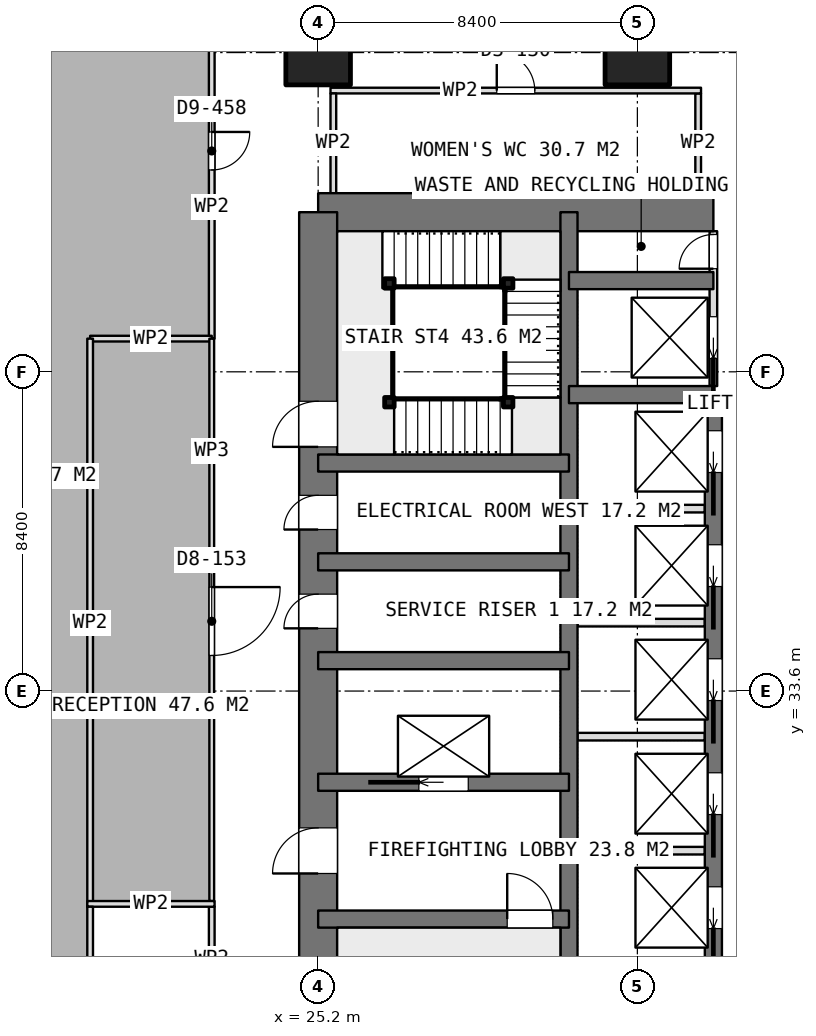
"""IFC4 building model, lengths in metres.
Left out: names, types, materials, properties, quantities, classifications, styles, units other than length and angle.
Written with IfcOpenShell. Run it as: python <this file> out.ifc"""

import sys

from ifc_helpers import new_model, si_unit, direction, frame, frame_2d, origin, origin_2d, place, context, subcontext, project, spatial, rectangle, extrude, element, fill, save


model = new_model("IFC4")
c1 = context("Model", 3, precision=1e-05, world=origin(), true_north=direction((0.0, 1.0)))
c2 = subcontext(c1, "Body", "Model", "MODEL_VIEW")
j1 = project(units=[si_unit("LENGTHUNIT", "METRE"), si_unit("PLANEANGLEUNIT", "RADIAN")], contexts=[c1])
p1 = place(None, origin())
s1 = spatial("IfcSite", under=j1, at=p1, CompositionType="ELEMENT")
p2 = place(p1, origin())
s2 = spatial("IfcBuilding", under=s1, at=p2, CompositionType="ELEMENT")
p3 = place(p2, frame((0.0, 0.0, 121.55)))
s3 = spatial("IfcBuildingStorey", under=s2, at=p3, CompositionType="ELEMENT", Elevation=121.55)
p4 = place(p3, frame((25.2, 46.2, 0.0), z_axis=(0.0, 0.0, 1.0), x_axis=(1.0, 0.0, 0.0)))
e1 = element("IfcWall", 1, at=p4, inside=s3, PredefinedType="SHEAR", context=c2, shape_type="SweptSolid", body=[
    extrude(rectangle(XDim=10.4, YDim=1.0, at=frame_2d((5.2, 0.0))), origin(), (0.0, 0.0, 1.0), 3.75),
])
p5 = place(p3, frame((25.2, 21.0, 0.0), z_axis=(0.0, 0.0, 1.0), x_axis=(0.0, 1.0, 0.0)))
e2 = element("IfcWall", 2, at=p5, inside=s3, PredefinedType="SHEAR", context=c2, shape_type="SweptSolid", body=[
    extrude(rectangle(XDim=25.2, YDim=1.0, at=frame_2d((12.6, 0.0))), origin(), (0.0, 0.0, 1.0), 3.75),
])
p6 = place(p5, frame((7.8, 0.0, 0.0)))
e3 = element("IfcOpeningElement", 3, at=p6, cuts=e2, PredefinedType="OPENING", context=c2, shape_type="SweptSolid", body=[
    extrude(rectangle(XDim=1.2, YDim=2.1, at=frame_2d((0.6, 1.05))), frame((0.0, 0.51, 0.0), z_axis=(0.0, -1.0, 0.0), x_axis=(1.0, 0.0, 0.0)), (0.0, 0.0, 1.0), 1.02),
])
p7 = place(p5, frame((14.25, 0.0, 0.0)))
e4 = element("IfcOpeningElement", 4, at=p7, cuts=e2, PredefinedType="OPENING", context=c2, shape_type="SweptSolid", body=[
    extrude(rectangle(XDim=0.9, YDim=2.1, at=frame_2d((0.45, 1.05))), frame((0.0, 0.51, 0.0), z_axis=(0.0, -1.0, 0.0), x_axis=(1.0, 0.0, 0.0)), (0.0, 0.0, 1.0), 1.02),
])
p8 = place(p5, frame((16.85, 0.0, 0.0)))
e5 = element("IfcOpeningElement", 5, at=p8, cuts=e2, PredefinedType="OPENING", context=c2, shape_type="SweptSolid", body=[
    extrude(rectangle(XDim=0.9, YDim=2.1, at=frame_2d((0.45, 1.05))), frame((0.0, 0.51, 0.0), z_axis=(0.0, -1.0, 0.0), x_axis=(1.0, 0.0, 0.0)), (0.0, 0.0, 1.0), 1.02),
])
p9 = place(p5, frame((19.025, 0.0, 0.0)))
e6 = element("IfcOpeningElement", 6, at=p9, cuts=e2, PredefinedType="OPENING", context=c2, shape_type="SweptSolid", body=[
    extrude(rectangle(XDim=1.2, YDim=2.1, at=frame_2d((0.6, 1.05))), frame((0.0, 0.51, 0.0), z_axis=(0.0, -1.0, 0.0), x_axis=(1.0, 0.0, 0.0)), (0.0, 0.0, 1.0), 1.02),
])
p10 = place(p3, frame((31.8, 21.0, 0.0), z_axis=(0.0, 0.0, 1.0), x_axis=(0.0, 1.0, 0.0)))
e7 = element("IfcWall", 7, at=p10, inside=s3, PredefinedType="SHEAR", context=c2, shape_type="SweptSolid", body=[
    extrude(rectangle(XDim=25.2, YDim=0.45, at=frame_2d((12.6, 0.0))), origin(), (0.0, 0.0, 1.0), 3.75),
])
p11 = place(p3, frame((35.6, 23.4, 0.0), z_axis=(0.0, 0.0, 1.0), x_axis=(0.0, 1.0, 0.0)))
e8 = element("IfcWall", 8, at=p11, inside=s3, PredefinedType="SHEAR", context=c2, shape_type="SweptSolid", body=[
    extrude(rectangle(XDim=18.0, YDim=0.45, at=frame_2d((9.0, 0.0))), origin(), (0.0, 0.0, 1.0), 3.75),
])
p12 = place(p11, frame((0.95, 0.0, 0.0)))
e9 = element("IfcOpeningElement", 9, at=p12, cuts=e8, PredefinedType="OPENING", context=c2, shape_type="SweptSolid", body=[
    extrude(rectangle(XDim=1.1, YDim=2.1, at=frame_2d((0.55, 1.05))), frame((0.0, 0.235, 0.0), z_axis=(0.0, -1.0, 0.0), x_axis=(1.0, 0.0, 0.0)), (0.0, 0.0, 1.0), 0.47),
])
p13 = place(p11, frame((3.95, 0.0, 0.0)))
e10 = element("IfcOpeningElement", 10, at=p13, cuts=e8, PredefinedType="OPENING", context=c2, shape_type="SweptSolid", body=[
    extrude(rectangle(XDim=1.1, YDim=2.1, at=frame_2d((0.55, 1.05))), frame((0.0, 0.235, 0.0), z_axis=(0.0, -1.0, 0.0), x_axis=(1.0, 0.0, 0.0)), (0.0, 0.0, 1.0), 0.47),
])
p14 = place(p11, frame((6.95, 0.0, 0.0)))
e11 = element("IfcOpeningElement", 11, at=p14, cuts=e8, PredefinedType="OPENING", context=c2, shape_type="SweptSolid", body=[
    extrude(rectangle(XDim=1.1, YDim=2.1, at=frame_2d((0.55, 1.05))), frame((0.0, 0.235, 0.0), z_axis=(0.0, -1.0, 0.0), x_axis=(1.0, 0.0, 0.0)), (0.0, 0.0, 1.0), 0.47),
])
p15 = place(p11, frame((9.95, 0.0, 0.0)))
e12 = element("IfcOpeningElement", 12, at=p15, cuts=e8, PredefinedType="OPENING", context=c2, shape_type="SweptSolid", body=[
    extrude(rectangle(XDim=1.1, YDim=2.1, at=frame_2d((0.55, 1.05))), frame((0.0, 0.235, 0.0), z_axis=(0.0, -1.0, 0.0), x_axis=(1.0, 0.0, 0.0)), (0.0, 0.0, 1.0), 0.47),
])
p16 = place(p11, frame((12.95, 0.0, 0.0)))
e13 = element("IfcOpeningElement", 13, at=p16, cuts=e8, PredefinedType="OPENING", context=c2, shape_type="SweptSolid", body=[
    extrude(rectangle(XDim=1.1, YDim=2.1, at=frame_2d((0.55, 1.05))), frame((0.0, 0.235, 0.0), z_axis=(0.0, -1.0, 0.0), x_axis=(1.0, 0.0, 0.0)), (0.0, 0.0, 1.0), 0.47),
])
p17 = place(p11, frame((15.95, 0.0, 0.0)))
e14 = element("IfcOpeningElement", 14, at=p17, cuts=e8, PredefinedType="OPENING", context=c2, shape_type="SweptSolid", body=[
    extrude(rectangle(XDim=1.1, YDim=2.1, at=frame_2d((0.55, 1.05))), frame((0.0, 0.235, 0.0), z_axis=(0.0, -1.0, 0.0), x_axis=(1.0, 0.0, 0.0)), (0.0, 0.0, 1.0), 0.47),
])
for number, where, z_axis, x_axis in (
    (15, (31.8, 41.4, 0.0), (0.0, 0.0, 1.0), (1.0, 0.0, 0.0)),
    (16, (31.8, 44.4, 0.0), (0.0, 0.0, 1.0), (1.0, 0.0, 0.0)),
):
    element("IfcWall", number, at=place(p3, frame(where, z_axis=z_axis, x_axis=x_axis)), inside=s3, PredefinedType="SHEAR", context=c2, shape_type="SweptSolid", body=[
        extrude(rectangle(XDim=3.8, YDim=0.45, at=frame_2d((1.9, 0.0))), origin(), (0.0, 0.0, 1.0), 3.75),
    ])
p18 = place(p3, frame((25.2, 27.6, 0.0), z_axis=(0.0, 0.0, 1.0), x_axis=(1.0, 0.0, 0.0)))
e17 = element("IfcWall", 17, at=p18, inside=s3, PredefinedType="SHEAR", context=c2, shape_type="SweptSolid", body=[
    extrude(rectangle(XDim=6.6, YDim=0.45, at=frame_2d((3.3, 0.0))), origin(), (0.0, 0.0, 1.0), 3.75),
])
p19 = place(p18, frame((4.975, 0.0, 0.0)))
e18 = element("IfcOpeningElement", 18, at=p19, cuts=e17, PredefinedType="OPENING", context=c2, shape_type="SweptSolid", body=[
    extrude(rectangle(XDim=1.2, YDim=2.1, at=frame_2d((0.6, 1.05))), frame((0.0, 0.235, 0.0), z_axis=(0.0, -1.0, 0.0), x_axis=(1.0, 0.0, 0.0)), (0.0, 0.0, 1.0), 0.47),
])
p20 = place(p3, frame((25.2, 31.2, 0.0), z_axis=(0.0, 0.0, 1.0), x_axis=(1.0, 0.0, 0.0)))
e19 = element("IfcWall", 19, at=p20, inside=s3, PredefinedType="SHEAR", context=c2, shape_type="SweptSolid", body=[
    extrude(rectangle(XDim=6.6, YDim=0.45, at=frame_2d((3.3, 0.0))), origin(), (0.0, 0.0, 1.0), 3.75),
])
p21 = place(p20, frame((2.65, 0.0, 0.0)))
e20 = element("IfcOpeningElement", 20, at=p21, cuts=e19, PredefinedType="OPENING", context=c2, shape_type="SweptSolid", body=[
    extrude(rectangle(XDim=1.3, YDim=2.1, at=frame_2d((0.65, 1.05))), frame((0.0, 0.235, 0.0), z_axis=(0.0, -1.0, 0.0), x_axis=(1.0, 0.0, 0.0)), (0.0, 0.0, 1.0), 0.47),
])
for number, where, z_axis, x_axis in (
    (21, (25.2, 34.4, 0.0), (0.0, 0.0, 1.0), (1.0, 0.0, 0.0)),
    (22, (25.2, 37.0, 0.0), (0.0, 0.0, 1.0), (1.0, 0.0, 0.0)),
    (23, (25.2, 39.6, 0.0), (0.0, 0.0, 1.0), (1.0, 0.0, 0.0)),
):
    element("IfcWall", number, at=place(p3, frame(where, z_axis=z_axis, x_axis=x_axis)), inside=s3, PredefinedType="SHEAR", context=c2, shape_type="SweptSolid", body=[
        extrude(rectangle(XDim=6.6, YDim=0.45, at=frame_2d((3.3, 0.0))), origin(), (0.0, 0.0, 1.0), 3.75),
    ])
for number, where, z_axis, x_axis in (
    (24, (25.2, 50.4, 0.0), (0.0, 0.0, 1.0), (1.0, 0.0, 0.0)),
    (25, (33.6, 50.4, 0.0), (0.0, 0.0, 1.0), (1.0, 0.0, 0.0)),
):
    element("IfcColumn", number, at=place(p3, frame(where, z_axis=z_axis, x_axis=x_axis)), inside=s3, PredefinedType="COLUMN", context=c2, shape_type="SweptSolid", body=[
        extrude(rectangle(XDim=1.7, YDim=1.7, at=origin_2d()), origin(), (0.0, 0.0, 1.0), 3.75),
    ])
for number, where, z_axis, x_axis in (
    (26, (32.025, 29.4, 0.0), (0.0, 0.0, 1.0), (1.0, 0.0, 0.0)),
    (27, (32.025, 32.4, 0.0), (0.0, 0.0, 1.0), (1.0, 0.0, 0.0)),
    (28, (32.025, 35.4, 0.0), (0.0, 0.0, 1.0), (1.0, 0.0, 0.0)),
    (29, (32.025, 38.4, 0.0), (0.0, 0.0, 1.0), (1.0, 0.0, 0.0)),
):
    element("IfcWall", number, at=place(p3, frame(where, z_axis=z_axis, x_axis=x_axis)), inside=s3, PredefinedType="PARTITIONING", context=c2, shape_type="SweptSolid", body=[
        extrude(rectangle(XDim=3.35, YDim=0.2, at=frame_2d((1.675, 0.0))), origin(), (0.0, 0.0, 1.0), 3.5),
    ])
p22 = place(p3, frame((35.6, 41.625, 0.0), z_axis=(0.0, 0.0, 1.0), x_axis=(0.0, 1.0, 0.0)))
e30 = element("IfcWall", 30, at=p22, inside=s3, PredefinedType="PARTITIONING", context=c2, shape_type="SweptSolid", body=[
    extrude(rectangle(XDim=4.075, YDim=0.2, at=frame_2d((2.038, 0.0))), origin(), (0.0, 0.0, 1.0), 3.5),
])
p23 = place(p22, frame((3.088, 0.0, 0.0)))
e31 = element("IfcOpeningElement", 31, at=p23, cuts=e30, PredefinedType="OPENING", context=c2, shape_type="SweptSolid", body=[
    extrude(rectangle(XDim=0.9, YDim=2.1, at=frame_2d((0.45, 1.05))), frame((0.0, 0.11, 0.0), z_axis=(0.0, -1.0, 0.0), x_axis=(1.0, 0.0, 0.0)), (0.0, 0.0, 1.0), 0.22),
])
p24 = place(p22, frame((0.725, 0.0, 0.0)))
e32 = element("IfcOpeningElement", 32, at=p24, cuts=e30, PredefinedType="OPENING", context=c2, shape_type="SweptSolid", body=[
    extrude(rectangle(XDim=1.1, YDim=2.1, at=frame_2d((0.55, 1.05))), frame((0.0, 0.11, 0.0), z_axis=(0.0, -1.0, 0.0), x_axis=(1.0, 0.0, 0.0)), (0.0, 0.0, 1.0), 0.22),
])
p25 = place(p3, frame((25.525, 49.4, 0.0), z_axis=(0.0, 0.0, 1.0), x_axis=(1.0, 0.0, 0.0)))
e33 = element("IfcWall", 33, at=p25, inside=s3, PredefinedType="PARTITIONING", context=c2, shape_type="SweptSolid", body=[
    extrude(rectangle(XDim=9.75, YDim=0.15, at=frame_2d((4.875, 0.0))), origin(), (0.0, 0.0, 1.0), 3.5),
])
p26 = place(p25, frame((4.375, 0.0, 0.0)))
e34 = element("IfcOpeningElement", 34, at=p26, cuts=e33, PredefinedType="OPENING", context=c2, shape_type="SweptSolid", body=[
    extrude(rectangle(XDim=1.0, YDim=2.1, at=frame_2d((0.5, 1.05))), frame((0.0, 0.085, 0.0), z_axis=(0.0, -1.0, 0.0), x_axis=(1.0, 0.0, 0.0)), (0.0, 0.0, 1.0), 0.17),
])
for number, where, z_axis, x_axis in (
    (35, (25.6, 46.7, 0.0), (0.0, 0.0, 1.0), (0.0, 1.0, 0.0)),
    (36, (35.2, 46.7, 0.0), (0.0, 0.0, 1.0), (0.0, 1.0, 0.0)),
):
    element("IfcWall", number, at=place(p3, frame(where, z_axis=z_axis, x_axis=x_axis)), inside=s3, PredefinedType="PARTITIONING", context=c2, shape_type="SweptSolid", body=[
        extrude(rectangle(XDim=2.625, YDim=0.15, at=frame_2d((1.312, 0.0))), origin(), (0.0, 0.0, 1.0), 3.5),
    ])
p27 = place(p3, frame((19.125, 28.0, 0.0), z_axis=(0.0, 0.0, 1.0), x_axis=(1.0, 0.0, 0.0)))
e37 = element("IfcWall", 37, at=p27, inside=s3, PredefinedType="PARTITIONING", context=c2, shape_type="SweptSolid", body=[
    extrude(rectangle(XDim=3.35, YDim=0.15, at=frame_2d((1.675, 0.0))), origin(), (0.0, 0.0, 1.0), 3.5),
])
p28 = place(p3, frame((19.2, 21.075, 0.0), z_axis=(0.0, 0.0, 1.0), x_axis=(0.0, 1.0, 0.0)))
e38 = element("IfcWall", 38, at=p28, inside=s3, PredefinedType="PARTITIONING", context=c2, shape_type="SweptSolid", body=[
    extrude(rectangle(XDim=6.85, YDim=0.15, at=frame_2d((3.425, 0.0))), origin(), (0.0, 0.0, 1.0), 3.5),
])
p29 = place(p3, frame((22.4, 21.075, 0.0), z_axis=(0.0, 0.0, 1.0), x_axis=(0.0, 1.0, 0.0)))
e39 = element("IfcWall", 39, at=p29, inside=s3, PredefinedType="PARTITIONING", context=c2, shape_type="SweptSolid", body=[
    extrude(rectangle(XDim=6.85, YDim=0.15, at=frame_2d((3.425, 0.0))), origin(), (0.0, 0.0, 1.0), 3.5),
])
p30 = place(p29, frame((2.925, 0.0, 0.0)))
e40 = element("IfcOpeningElement", 40, at=p30, cuts=e39, PredefinedType="OPENING", context=c2, shape_type="SweptSolid", body=[
    extrude(rectangle(XDim=1.0, YDim=2.1, at=frame_2d((0.5, 1.05))), frame((0.0, 0.085, 0.0), z_axis=(0.0, -1.0, 0.0), x_axis=(1.0, 0.0, 0.0)), (0.0, 0.0, 1.0), 0.17),
])
p31 = place(p3, frame((22.4, 52.75, 0.0), z_axis=(0.0, 0.0, 1.0), x_axis=(0.0, -1.0, 0.0)))
e41 = element("IfcWall", 41, at=p31, inside=s3, PredefinedType="PARTITIONING", context=c2, shape_type="SweptSolid", body=[
    extrude(rectangle(XDim=9.877, YDim=0.15, at=frame_2d((4.938, 0.0))), origin(), (0.0, 0.0, 1.0), 3.5),
])
p32 = place(p31, frame((4.439, 0.0, 0.0)))
e42 = element("IfcOpeningElement", 42, at=p32, cuts=e41, PredefinedType="OPENING", context=c2, shape_type="SweptSolid", body=[
    extrude(rectangle(XDim=1.0, YDim=2.1, at=frame_2d((0.5, 1.05))), frame((0.0, 0.085, 0.0), z_axis=(0.0, -1.0, 0.0), x_axis=(1.0, 0.0, 0.0)), (0.0, 0.0, 1.0), 0.17),
])
p33 = place(p3, frame((22.4, 42.873, 0.0), z_axis=(0.0, 0.0, 1.0), x_axis=(-1.0, 0.0, 0.0)))
e43 = element("IfcWall", 43, at=p33, inside=s3, PredefinedType="PARTITIONING", context=c2, shape_type="SweptSolid", body=[
    extrude(rectangle(XDim=3.2, YDim=0.15, at=frame_2d((1.6, 0.0))), origin(), (0.0, 0.0, 1.0), 3.5),
])
p34 = place(p3, frame((19.2, 42.873, 0.0), z_axis=(0.0, 0.0, 1.0), x_axis=(0.0, -1.0, 0.0)))
e44 = element("IfcWall", 44, at=p34, inside=s3, PredefinedType="PARTITIONING", context=c2, shape_type="SweptSolid", body=[
    extrude(rectangle(XDim=14.948, YDim=0.15, at=frame_2d((7.474, 0.0))), origin(), (0.0, 0.0, 1.0), 3.5),
])
p35 = place(p3, frame((22.4, 42.872, 0.0), z_axis=(0.0, 0.0, 1.0), x_axis=(0.0, -1.0, 0.0)))
e45 = element("IfcWall", 45, at=p35, inside=s3, PredefinedType="PARTITIONING", context=c2, shape_type="SweptSolid", body=[
    extrude(rectangle(XDim=14.797, YDim=0.125, at=frame_2d((7.398, 0.0))), origin(), (0.0, 0.0, 1.0), 3.5),
])
p36 = place(p35, frame((6.536, 0.0, 0.0)))
e46 = element("IfcOpeningElement", 46, at=p36, cuts=e45, PredefinedType="OPENING", context=c2, shape_type="SweptSolid", body=[
    extrude(rectangle(XDim=1.8, YDim=2.1, at=frame_2d((0.9, 1.05))), frame((0.0, 0.073, 0.0), z_axis=(0.0, -1.0, 0.0), x_axis=(1.0, 0.0, 0.0)), (0.0, 0.0, 1.0), 0.145),
])
for number, where, z_axis, x_axis in (
    (47, (27.075, 41.2, 0.0), (0.0, 0.0, 1.0), (1.0, 0.0, 0.0)),
    (48, (30.2, 41.2, 0.0), (0.0, 0.0, 1.0), (1.0, 0.0, 0.0)),
    (49, (30.2, 44.325, 0.0), (0.0, 0.0, 1.0), (1.0, 0.0, 0.0)),
    (50, (27.075, 44.325, 0.0), (0.0, 0.0, 1.0), (1.0, 0.0, 0.0)),
):
    element("IfcColumn", number, at=place(p3, frame(where, z_axis=z_axis, x_axis=x_axis)), inside=s3, PredefinedType="COLUMN", context=c2, shape_type="SweptSolid", body=[
        extrude(rectangle(XDim=0.25, YDim=0.25, at=origin_2d()), origin(), (0.0, 0.0, 1.0), 3.75),
    ])
p37 = place(p6, origin())
e51 = element("IfcDoor", 51, at=p37, inside=s3, OperationType="SINGLE_SWING_LEFT", PredefinedType="DOOR", context=c2, shape_type="SweptSolid", body=[
    extrude(rectangle(XDim=1.2, YDim=2.1, at=frame_2d((0.6, 1.05))), frame((0.0, 0.025, 0.0), z_axis=(0.0, -1.0, 0.0), x_axis=(1.0, 0.0, 0.0)), (0.0, 0.0, 1.0), 0.05),
])
fill(e3, e51)
p38 = place(p7, origin())
e52 = element("IfcDoor", 52, at=p38, inside=s3, OperationType="SINGLE_SWING_LEFT", PredefinedType="DOOR", context=c2, shape_type="SweptSolid", body=[
    extrude(rectangle(XDim=0.9, YDim=2.1, at=frame_2d((0.45, 1.05))), frame((0.0, 0.025, 0.0), z_axis=(0.0, -1.0, 0.0), x_axis=(1.0, 0.0, 0.0)), (0.0, 0.0, 1.0), 0.05),
])
fill(e4, e52)
p39 = place(p8, origin())
e53 = element("IfcDoor", 53, at=p39, inside=s3, OperationType="SINGLE_SWING_LEFT", PredefinedType="DOOR", context=c2, shape_type="SweptSolid", body=[
    extrude(rectangle(XDim=0.9, YDim=2.1, at=frame_2d((0.45, 1.05))), frame((0.0, 0.025, 0.0), z_axis=(0.0, -1.0, 0.0), x_axis=(1.0, 0.0, 0.0)), (0.0, 0.0, 1.0), 0.05),
])
fill(e5, e53)
p40 = place(p23, origin())
e54 = element("IfcDoor", 54, at=p40, inside=s3, OperationType="SINGLE_SWING_LEFT", PredefinedType="DOOR", context=c2, shape_type="SweptSolid", body=[
    extrude(rectangle(XDim=0.9, YDim=2.1, at=frame_2d((0.45, 1.05))), frame((0.0, 0.025, 0.0), z_axis=(0.0, -1.0, 0.0), x_axis=(1.0, 0.0, 0.0)), (0.0, 0.0, 1.0), 0.05),
])
fill(e31, e54)
p41 = place(p13, origin())
e55 = element("IfcDoor", 55, at=p41, inside=s3, OperationType="SLIDING_TO_LEFT", PredefinedType="USERDEFINED", context=c2, shape_type="SweptSolid", body=[
    extrude(rectangle(XDim=1.1, YDim=2.1, at=frame_2d((0.55, 1.05))), frame((0.0, 0.025, 0.0), z_axis=(0.0, -1.0, 0.0), x_axis=(1.0, 0.0, 0.0)), (0.0, 0.0, 1.0), 0.05),
])
fill(e10, e55)
p42 = place(p14, origin())
e56 = element("IfcDoor", 56, at=p42, inside=s3, OperationType="SLIDING_TO_LEFT", PredefinedType="USERDEFINED", context=c2, shape_type="SweptSolid", body=[
    extrude(rectangle(XDim=1.1, YDim=2.1, at=frame_2d((0.55, 1.05))), frame((0.0, 0.025, 0.0), z_axis=(0.0, -1.0, 0.0), x_axis=(1.0, 0.0, 0.0)), (0.0, 0.0, 1.0), 0.05),
])
fill(e11, e56)
p43 = place(p15, origin())
e57 = element("IfcDoor", 57, at=p43, inside=s3, OperationType="SLIDING_TO_LEFT", PredefinedType="USERDEFINED", context=c2, shape_type="SweptSolid", body=[
    extrude(rectangle(XDim=1.1, YDim=2.1, at=frame_2d((0.55, 1.05))), frame((0.0, 0.025, 0.0), z_axis=(0.0, -1.0, 0.0), x_axis=(1.0, 0.0, 0.0)), (0.0, 0.0, 1.0), 0.05),
])
fill(e12, e57)
p44 = place(p16, origin())
e58 = element("IfcDoor", 58, at=p44, inside=s3, OperationType="SLIDING_TO_LEFT", PredefinedType="USERDEFINED", context=c2, shape_type="SweptSolid", body=[
    extrude(rectangle(XDim=1.1, YDim=2.1, at=frame_2d((0.55, 1.05))), frame((0.0, 0.025, 0.0), z_axis=(0.0, -1.0, 0.0), x_axis=(1.0, 0.0, 0.0)), (0.0, 0.0, 1.0), 0.05),
])
fill(e13, e58)
p45 = place(p17, origin())
e59 = element("IfcDoor", 59, at=p45, inside=s3, OperationType="SLIDING_TO_LEFT", PredefinedType="USERDEFINED", context=c2, shape_type="SweptSolid", body=[
    extrude(rectangle(XDim=1.1, YDim=2.1, at=frame_2d((0.55, 1.05))), frame((0.0, 0.025, 0.0), z_axis=(0.0, -1.0, 0.0), x_axis=(1.0, 0.0, 0.0)), (0.0, 0.0, 1.0), 0.05),
])
fill(e14, e59)
p46 = place(p21, origin())
e60 = element("IfcDoor", 60, at=p46, inside=s3, OperationType="SLIDING_TO_LEFT", PredefinedType="USERDEFINED", context=c2, shape_type="SweptSolid", body=[
    extrude(rectangle(XDim=1.3, YDim=2.1, at=frame_2d((0.65, 1.05))), frame((0.0, 0.025, 0.0), z_axis=(0.0, -1.0, 0.0), x_axis=(1.0, 0.0, 0.0)), (0.0, 0.0, 1.0), 0.05),
])
fill(e20, e60)
p47 = place(p24, origin())
e61 = element("IfcDoor", 61, at=p47, inside=s3, OperationType="SLIDING_TO_LEFT", PredefinedType="USERDEFINED", context=c2, shape_type="SweptSolid", body=[
    extrude(rectangle(XDim=1.1, YDim=2.1, at=frame_2d((0.55, 1.05))), frame((0.0, 0.025, 0.0), z_axis=(0.0, -1.0, 0.0), x_axis=(1.0, 0.0, 0.0)), (0.0, 0.0, 1.0), 0.05),
])
fill(e32, e61)
p48 = place(p26, origin())
e62 = element("IfcDoor", 62, at=p48, inside=s3, OperationType="SINGLE_SWING_LEFT", PredefinedType="DOOR", context=c2, shape_type="SweptSolid", body=[
    extrude(rectangle(XDim=1.0, YDim=2.1, at=frame_2d((0.5, 1.05))), frame((0.0, 0.025, 0.0), z_axis=(0.0, -1.0, 0.0), x_axis=(1.0, 0.0, 0.0)), (0.0, 0.0, 1.0), 0.05),
])
fill(e34, e62)
p49 = place(p32, origin())
e63 = element("IfcDoor", 63, at=p49, inside=s3, OperationType="SINGLE_SWING_LEFT", PredefinedType="DOOR", context=c2, shape_type="SweptSolid", body=[
    extrude(rectangle(XDim=1.0, YDim=2.1, at=frame_2d((0.5, 1.05))), frame((0.0, 0.025, 0.0), z_axis=(0.0, -1.0, 0.0), x_axis=(1.0, 0.0, 0.0)), (0.0, 0.0, 1.0), 0.05),
])
fill(e42, e63)
p50 = place(p36, origin())
e64 = element("IfcDoor", 64, at=p50, inside=s3, OperationType="DOUBLE_DOOR_SINGLE_SWING", PredefinedType="DOOR", context=c2, shape_type="SweptSolid", body=[
    extrude(rectangle(XDim=1.8, YDim=2.1, at=frame_2d((0.9, 1.05))), frame((0.0, 0.025, 0.0), z_axis=(0.0, -1.0, 0.0), x_axis=(1.0, 0.0, 0.0)), (0.0, 0.0, 1.0), 0.05),
])
fill(e46, e64)
p51 = place(p19, origin())
e65 = element("IfcDoor", 65, at=p51, inside=s3, OperationType="SINGLE_SWING_RIGHT", PredefinedType="DOOR", context=c2, shape_type="SweptSolid", body=[
    extrude(rectangle(XDim=1.2, YDim=2.1, at=frame_2d((0.6, 1.05))), frame((0.0, 0.025, 0.0), z_axis=(0.0, -1.0, 0.0), x_axis=(1.0, 0.0, 0.0)), (0.0, 0.0, 1.0), 0.05),
])
fill(e18, e65)
p52 = place(p9, origin())
e66 = element("IfcDoor", 66, at=p52, inside=s3, OperationType="SINGLE_SWING_RIGHT", PredefinedType="DOOR", context=c2, shape_type="SweptSolid", body=[
    extrude(rectangle(XDim=1.2, YDim=2.1, at=frame_2d((0.6, 1.05))), frame((0.0, 0.025, 0.0), z_axis=(0.0, -1.0, 0.0), x_axis=(1.0, 0.0, 0.0)), (0.0, 0.0, 1.0), 0.05),
])
fill(e6, e66)
save(model, sys.argv[1])
